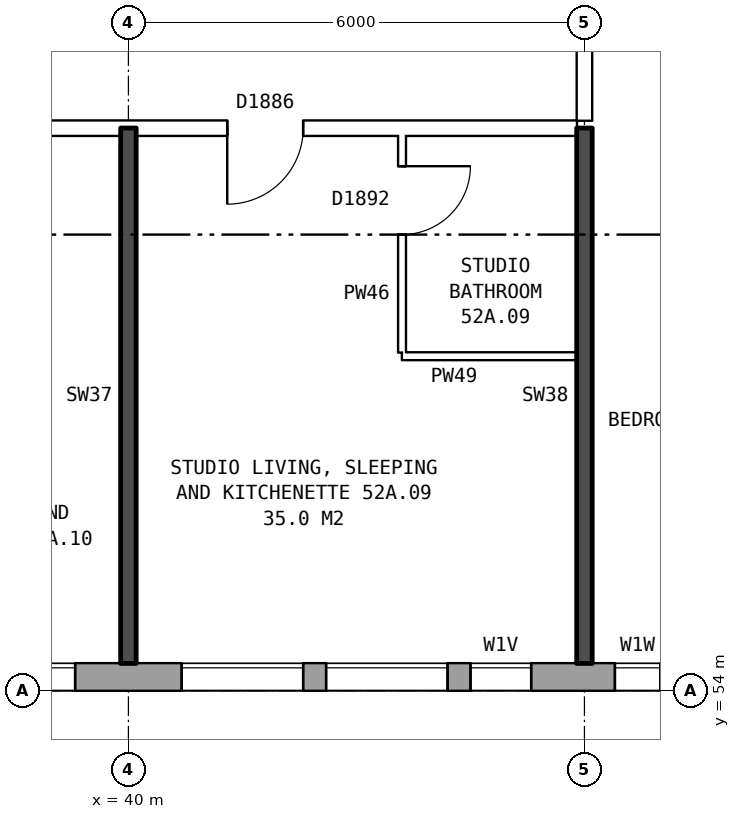
"""IFC4 building model, lengths in metres.
Left out: names, types, materials, properties, quantities, classifications, styles, units other than length and angle.
Written with IfcOpenShell. Run it as: python <this file> out.ifc"""

import sys

from ifc_helpers import new_model, si_unit, direction, frame, frame_2d, origin, place, context, subcontext, project, spatial, rectangle, extrude, element, fill, save


model = new_model("IFC4")
c1 = context("Model", 3, precision=1e-05, world=origin(), true_north=direction((0.0, 1.0)))
c2 = subcontext(c1, "Body", "Model", "MODEL_VIEW")
j1 = project(units=[si_unit("LENGTHUNIT", "METRE"), si_unit("PLANEANGLEUNIT", "RADIAN")], contexts=[c1])
p1 = place(None, origin())
s1 = spatial("IfcSite", under=j1, at=p1, CompositionType="ELEMENT")
p2 = place(p1, origin())
s2 = spatial("IfcBuilding", under=s1, at=p2, CompositionType="ELEMENT")
p3 = place(p2, frame((0.0, 0.0, 185.1)))
s3 = spatial("IfcBuildingStorey", under=s2, at=p3, CompositionType="ELEMENT", Elevation=185.1)
p4 = place(p3, frame((33.325, 54.18, 0.0), z_axis=(0.0, 0.0, 1.0), x_axis=(1.0, 0.0, 0.0)))
e1 = element("IfcWall", 1, at=p4, inside=s3, PredefinedType="STANDARD", context=c2, shape_type="SweptSolid", body=[
    extrude(rectangle(XDim=39.601, YDim=0.36, at=frame_2d((19.8, 0.0))), origin(), (0.0, 0.0, 1.0), 2.85),
])
p5 = place(p4, frame((1.375, 0.0, 0.8)))
e2 = element("IfcOpeningElement", 2, at=p5, cuts=e1, PredefinedType="OPENING", context=c2, shape_type="SweptSolid", body=[
    extrude(rectangle(XDim=1.6, YDim=1.8, at=frame_2d((0.8, 0.9))), frame((0.0, 0.19, 0.0), z_axis=(0.0, -1.0, 0.0), x_axis=(1.0, 0.0, 0.0)), (0.0, 0.0, 1.0), 0.38),
])
p6 = place(p4, frame((4.375, 0.0, 0.8)))
e3 = element("IfcOpeningElement", 3, at=p6, cuts=e1, PredefinedType="OPENING", context=c2, shape_type="SweptSolid", body=[
    extrude(rectangle(XDim=1.6, YDim=1.8, at=frame_2d((0.8, 0.9))), frame((0.0, 0.19, 0.0), z_axis=(0.0, -1.0, 0.0), x_axis=(1.0, 0.0, 0.0)), (0.0, 0.0, 1.0), 0.38),
])
p7 = place(p4, frame((7.375, 0.0, 0.8)))
e4 = element("IfcOpeningElement", 4, at=p7, cuts=e1, PredefinedType="OPENING", context=c2, shape_type="SweptSolid", body=[
    extrude(rectangle(XDim=1.6, YDim=1.8, at=frame_2d((0.8, 0.9))), frame((0.0, 0.19, 0.0), z_axis=(0.0, -1.0, 0.0), x_axis=(1.0, 0.0, 0.0)), (0.0, 0.0, 1.0), 0.38),
])
p8 = place(p4, frame((9.275, 0.0, 0.8)))
e5 = element("IfcOpeningElement", 5, at=p8, cuts=e1, PredefinedType="OPENING", context=c2, shape_type="SweptSolid", body=[
    extrude(rectangle(XDim=1.6, YDim=1.8, at=frame_2d((0.8, 0.9))), frame((0.0, 0.19, 0.0), z_axis=(0.0, -1.0, 0.0), x_axis=(1.0, 0.0, 0.0)), (0.0, 0.0, 1.0), 0.38),
])
p9 = place(p4, frame((13.075, 0.0, 0.8)))
e6 = element("IfcOpeningElement", 6, at=p9, cuts=e1, PredefinedType="OPENING", context=c2, shape_type="SweptSolid", body=[
    extrude(rectangle(XDim=0.6, YDim=0.9, at=frame_2d((0.3, 0.45))), frame((0.0, 0.19, 0.0), z_axis=(0.0, -1.0, 0.0), x_axis=(1.0, 0.0, 0.0)), (0.0, 0.0, 1.0), 0.38),
])
p10 = place(p4, frame((16.375, 0.0, 0.8)))
e7 = element("IfcOpeningElement", 7, at=p10, cuts=e1, PredefinedType="OPENING", context=c2, shape_type="SweptSolid", body=[
    extrude(rectangle(XDim=1.6, YDim=1.8, at=frame_2d((0.8, 0.9))), frame((0.0, 0.19, 0.0), z_axis=(0.0, -1.0, 0.0), x_axis=(1.0, 0.0, 0.0)), (0.0, 0.0, 1.0), 0.38),
])
p11 = place(p4, frame((19.375, 0.0, 0.8)))
e8 = element("IfcOpeningElement", 8, at=p11, cuts=e1, PredefinedType="OPENING", context=c2, shape_type="SweptSolid", body=[
    extrude(rectangle(XDim=1.6, YDim=1.8, at=frame_2d((0.8, 0.9))), frame((0.0, 0.19, 0.0), z_axis=(0.0, -1.0, 0.0), x_axis=(1.0, 0.0, 0.0)), (0.0, 0.0, 1.0), 0.38),
])
p12 = place(p4, frame((22.375, 0.0, 0.8)))
e9 = element("IfcOpeningElement", 9, at=p12, cuts=e1, PredefinedType="OPENING", context=c2, shape_type="SweptSolid", body=[
    extrude(rectangle(XDim=1.6, YDim=1.8, at=frame_2d((0.8, 0.9))), frame((0.0, 0.19, 0.0), z_axis=(0.0, -1.0, 0.0), x_axis=(1.0, 0.0, 0.0)), (0.0, 0.0, 1.0), 0.38),
])
p13 = place(p4, frame((24.875, 0.0, 0.75)))
e10 = element("IfcOpeningElement", 10, at=p13, cuts=e1, PredefinedType="OPENING", context=c2, shape_type="SweptSolid", body=[
    extrude(rectangle(XDim=0.8, YDim=1.8, at=frame_2d((0.4, 0.9))), frame((0.0, 0.19, 0.0), z_axis=(0.0, -1.0, 0.0), x_axis=(1.0, 0.0, 0.0)), (0.0, 0.0, 1.0), 0.38),
])
p14 = place(p4, frame((28.375, 0.0, 0.8)))
e11 = element("IfcOpeningElement", 11, at=p14, cuts=e1, PredefinedType="OPENING", context=c2, shape_type="SweptSolid", body=[
    extrude(rectangle(XDim=1.6, YDim=1.8, at=frame_2d((0.8, 0.9))), frame((0.0, 0.19, 0.0), z_axis=(0.0, -1.0, 0.0), x_axis=(1.0, 0.0, 0.0)), (0.0, 0.0, 1.0), 0.38),
])
p15 = place(p4, frame((31.375, 0.0, 0.8)))
e12 = element("IfcOpeningElement", 12, at=p15, cuts=e1, PredefinedType="OPENING", context=c2, shape_type="SweptSolid", body=[
    extrude(rectangle(XDim=1.6, YDim=1.8, at=frame_2d((0.8, 0.9))), frame((0.0, 0.19, 0.0), z_axis=(0.0, -1.0, 0.0), x_axis=(1.0, 0.0, 0.0)), (0.0, 0.0, 1.0), 0.38),
])
p16 = place(p4, frame((34.375, 0.0, 0.8)))
e13 = element("IfcOpeningElement", 13, at=p16, cuts=e1, PredefinedType="OPENING", context=c2, shape_type="SweptSolid", body=[
    extrude(rectangle(XDim=1.6, YDim=1.8, at=frame_2d((0.8, 0.9))), frame((0.0, 0.19, 0.0), z_axis=(0.0, -1.0, 0.0), x_axis=(1.0, 0.0, 0.0)), (0.0, 0.0, 1.0), 0.38),
])
p17 = place(p4, frame((37.375, 0.0, 0.8)))
e14 = element("IfcOpeningElement", 14, at=p17, cuts=e1, PredefinedType="OPENING", context=c2, shape_type="SweptSolid", body=[
    extrude(rectangle(XDim=1.6, YDim=1.8, at=frame_2d((0.8, 0.9))), frame((0.0, 0.19, 0.0), z_axis=(0.0, -1.0, 0.0), x_axis=(1.0, 0.0, 0.0)), (0.0, 0.0, 1.0), 0.38),
])
p18 = place(p4, frame((11.175, 0.0, 1.7)))
e15 = element("IfcOpeningElement", 15, at=p18, cuts=e1, PredefinedType="OPENING", context=c2, shape_type="SweptSolid", body=[
    extrude(rectangle(XDim=0.8, YDim=0.9, at=frame_2d((0.4, 0.45))), frame((0.0, 0.19, 0.0), z_axis=(0.0, -1.0, 0.0), x_axis=(1.0, 0.0, 0.0)), (0.0, 0.0, 1.0), 0.38),
])
p19 = place(p4, frame((13.975, 0.0, 0.8)))
e16 = element("IfcOpeningElement", 16, at=p19, cuts=e1, PredefinedType="OPENING", context=c2, shape_type="SweptSolid", body=[
    extrude(rectangle(XDim=1.4, YDim=1.8, at=frame_2d((0.7, 0.9))), frame((0.0, 0.19, 0.0), z_axis=(0.0, -1.0, 0.0), x_axis=(1.0, 0.0, 0.0)), (0.0, 0.0, 1.0), 0.38),
])
p20 = place(p4, frame((25.975, 0.0, 0.55)))
e17 = element("IfcOpeningElement", 17, at=p20, cuts=e1, PredefinedType="OPENING", context=c2, shape_type="SweptSolid", body=[
    extrude(rectangle(XDim=0.8, YDim=0.9, at=frame_2d((0.4, 0.45))), frame((0.0, 0.19, 0.0), z_axis=(0.0, -1.0, 0.0), x_axis=(1.0, 0.0, 0.0)), (0.0, 0.0, 1.0), 0.38),
])
p21 = place(p3, frame((43.6, 58.4, 0.0), z_axis=(0.0, 0.0, 1.0), x_axis=(1.0, 0.0, 0.0)))
e18 = element("IfcWall", 18, at=p21, inside=s3, PredefinedType="PARTITIONING", context=c2, shape_type="SweptSolid", body=[
    extrude(rectangle(XDim=2.3, YDim=0.1, at=frame_2d((1.15, 0.0))), origin(), (0.0, 0.0, 1.0), 2.85),
])
p22 = place(p3, frame((30.61, 61.4, 0.0), z_axis=(0.0, 0.0, 1.0), x_axis=(1.0, 0.0, 0.0)))
e19 = element("IfcWall", 19, at=p22, inside=s3, PredefinedType="PARTITIONING", context=c2, shape_type="SweptSolid", body=[
    extrude(rectangle(XDim=15.29, YDim=0.2, at=frame_2d((7.645, 0.0))), origin(), (0.0, 0.0, 1.0), 2.85),
])
p23 = place(p22, frame((10.69, 0.0, 0.0)))
e20 = element("IfcOpeningElement", 20, at=p23, cuts=e19, PredefinedType="OPENING", context=c2, shape_type="SweptSolid", body=[
    extrude(rectangle(XDim=1.0, YDim=2.1, at=frame_2d((0.5, 1.05))), frame((0.0, 0.11, 0.0), z_axis=(0.0, -1.0, 0.0), x_axis=(1.0, 0.0, 0.0)), (0.0, 0.0, 1.0), 0.22),
])
p24 = place(p22, frame((5.89, 0.0, 0.0)))
e21 = element("IfcOpeningElement", 21, at=p24, cuts=e19, PredefinedType="OPENING", context=c2, shape_type="SweptSolid", body=[
    extrude(rectangle(XDim=1.0, YDim=2.1, at=frame_2d((0.5, 1.05))), frame((0.0, 0.11, 0.0), z_axis=(0.0, -1.0, 0.0), x_axis=(1.0, 0.0, 0.0)), (0.0, 0.0, 1.0), 0.22),
])
p25 = place(p3, frame((40.0, 54.36, 0.0), z_axis=(0.0, 0.0, 1.0), x_axis=(0.0, 1.0, 0.0)))
e22 = element("IfcWall", 22, at=p25, inside=s3, PredefinedType="SOLIDWALL", context=c2, shape_type="SweptSolid", body=[
    extrude(rectangle(XDim=7.04, YDim=0.2, at=frame_2d((3.52, 0.0))), origin(), (0.0, 0.0, 1.0), 2.85),
])
p26 = place(p3, frame((43.6, 58.45, 0.0), z_axis=(0.0, 0.0, 1.0), x_axis=(0.0, 1.0, 0.0)))
e23 = element("IfcWall", 23, at=p26, inside=s3, PredefinedType="PARTITIONING", context=c2, shape_type="SweptSolid", body=[
    extrude(rectangle(XDim=2.85, YDim=0.1, at=frame_2d((1.425, 0.0))), origin(), (0.0, 0.0, 1.0), 2.85),
])
p27 = place(p26, frame((1.55, 0.0, 0.0)))
e24 = element("IfcOpeningElement", 24, at=p27, cuts=e23, PredefinedType="OPENING", context=c2, shape_type="SweptSolid", body=[
    extrude(rectangle(XDim=0.9, YDim=2.1, at=frame_2d((0.45, 1.05))), frame((0.0, 0.06, 0.0), z_axis=(0.0, -1.0, 0.0), x_axis=(1.0, 0.0, 0.0)), (0.0, 0.0, 1.0), 0.12),
])
p28 = place(p3, frame((46.0, 54.36, 0.0), z_axis=(0.0, 0.0, 1.0), x_axis=(0.0, 1.0, 0.0)))
e25 = element("IfcWall", 25, at=p28, inside=s3, PredefinedType="SOLIDWALL", context=c2, shape_type="SweptSolid", body=[
    extrude(rectangle(XDim=7.04, YDim=0.2, at=frame_2d((3.52, 0.0))), origin(), (0.0, 0.0, 1.0), 2.85),
])
p29 = place(p3, frame((46.0, 61.5, 0.0), z_axis=(0.0, 0.0, 1.0), x_axis=(0.0, 1.0, 0.0)))
e26 = element("IfcWall", 26, at=p29, inside=s3, PredefinedType="PARTITIONING", context=c2, shape_type="SweptSolid", body=[
    extrude(rectangle(XDim=2.2, YDim=0.2, at=frame_2d((1.1, 0.0))), origin(), (0.0, 0.0, 1.0), 2.85),
])
p30 = place(p6, origin())
e27 = element("IfcWindow", 27, at=p30, inside=s3, PartitioningType="SINGLE_PANEL", PredefinedType="WINDOW", context=c2, shape_type="SweptSolid", body=[
    extrude(rectangle(XDim=1.6, YDim=1.8, at=frame_2d((0.8, 0.9))), frame((0.0, 0.15, 0.0), z_axis=(0.0, -1.0, 0.0), x_axis=(1.0, 0.0, 0.0)), (0.0, 0.0, 1.0), 0.06),
])
fill(e3, e27)
p31 = place(p7, origin())
e28 = element("IfcWindow", 28, at=p31, inside=s3, PartitioningType="SINGLE_PANEL", PredefinedType="WINDOW", context=c2, shape_type="SweptSolid", body=[
    extrude(rectangle(XDim=1.6, YDim=1.8, at=frame_2d((0.8, 0.9))), frame((0.0, 0.15, 0.0), z_axis=(0.0, -1.0, 0.0), x_axis=(1.0, 0.0, 0.0)), (0.0, 0.0, 1.0), 0.06),
])
fill(e4, e28)
p32 = place(p8, origin())
e29 = element("IfcWindow", 29, at=p32, inside=s3, PartitioningType="SINGLE_PANEL", PredefinedType="WINDOW", context=c2, shape_type="SweptSolid", body=[
    extrude(rectangle(XDim=1.6, YDim=1.8, at=frame_2d((0.8, 0.9))), frame((0.0, 0.15, 0.0), z_axis=(0.0, -1.0, 0.0), x_axis=(1.0, 0.0, 0.0)), (0.0, 0.0, 1.0), 0.06),
])
fill(e5, e29)
p33 = place(p9, origin())
e30 = element("IfcWindow", 30, at=p33, inside=s3, PartitioningType="SINGLE_PANEL", PredefinedType="WINDOW", context=c2, shape_type="SweptSolid", body=[
    extrude(rectangle(XDim=0.6, YDim=0.9, at=frame_2d((0.3, 0.45))), frame((0.0, 0.15, 0.0), z_axis=(0.0, -1.0, 0.0), x_axis=(1.0, 0.0, 0.0)), (0.0, 0.0, 1.0), 0.06),
])
fill(e6, e30)
p34 = place(p23, frame((1.0, 0.0, 0.0), z_axis=(0.0, 0.0, 1.0), x_axis=(-1.0, 0.0, 0.0)))
e31 = element("IfcDoor", 31, at=p34, inside=s3, OperationType="SINGLE_SWING_RIGHT", PredefinedType="DOOR", context=c2, shape_type="SweptSolid", body=[
    extrude(rectangle(XDim=1.0, YDim=2.1, at=frame_2d((0.5, 1.05))), frame((0.0, 0.025, 0.0), z_axis=(0.0, -1.0, 0.0), x_axis=(1.0, 0.0, 0.0)), (0.0, 0.0, 1.0), 0.05),
])
fill(e20, e31)
p35 = place(p27, frame((0.9, 0.0, 0.0), z_axis=(0.0, 0.0, 1.0), x_axis=(-1.0, 0.0, 0.0)))
e32 = element("IfcDoor", 32, at=p35, inside=s3, OperationType="SINGLE_SWING_LEFT", PredefinedType="DOOR", context=c2, shape_type="SweptSolid", body=[
    extrude(rectangle(XDim=0.9, YDim=2.1, at=frame_2d((0.45, 1.05))), frame((0.0, 0.025, 0.0), z_axis=(0.0, -1.0, 0.0), x_axis=(1.0, 0.0, 0.0)), (0.0, 0.0, 1.0), 0.05),
])
fill(e24, e32)
p36 = place(p18, origin())
e33 = element("IfcWindow", 33, at=p36, inside=s3, PartitioningType="SINGLE_PANEL", PredefinedType="WINDOW", context=c2, shape_type="SweptSolid", body=[
    extrude(rectangle(XDim=0.8, YDim=0.9, at=frame_2d((0.4, 0.45))), frame((0.0, 0.15, 0.0), z_axis=(0.0, -1.0, 0.0), x_axis=(1.0, 0.0, 0.0)), (0.0, 0.0, 1.0), 0.06),
])
fill(e15, e33)
save(model, sys.argv[1])
